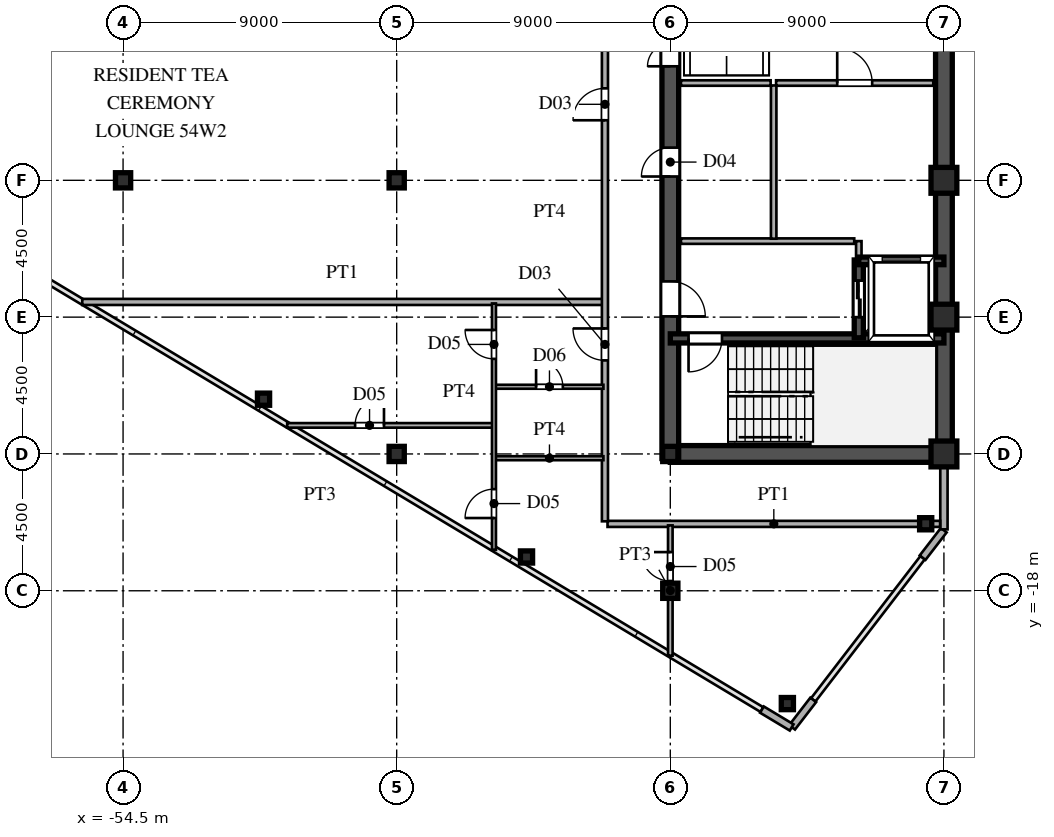
"""IFC4 building model, lengths in metres.
Left out: names, types, materials, properties, quantities, classifications, styles, units other than length and angle.
Written with IfcOpenShell. Run it as: python <this file> out.ifc"""

import sys

from ifc_helpers import new_model, si_unit, direction, frame, frame_2d, origin, origin_2d, place, context, subcontext, project, spatial, rectangle, hollow_rectangle, i_section, extrude, source, transform, mapped, element, fill, save


model = new_model("IFC4")
c1 = context("Model", 3, precision=1e-05, world=origin(), true_north=direction((0.0, 1.0)))
c2 = subcontext(c1, "Body", "Model", "MODEL_VIEW")
j1 = project(units=[si_unit("LENGTHUNIT", "METRE"), si_unit("PLANEANGLEUNIT", "RADIAN")], contexts=[c1])
p1 = place(None, origin())
s1 = spatial("IfcSite", under=j1, at=p1, CompositionType="ELEMENT")
p2 = place(p1, origin())
s2 = spatial("IfcBuilding", under=s1, at=p2, CompositionType="ELEMENT")
p3 = place(p2, frame((0.0, 0.0, 203.1)))
s3 = spatial("IfcBuildingStorey", under=s2, at=p3, CompositionType="ELEMENT", Elevation=203.1)
m1 = source(origin(), c2, "Body", "SweptSolid", [
    extrude(hollow_rectangle(XDim=0.85, YDim=0.85, WallThickness=0.036, at=origin_2d()), origin(), (0.0, 0.0, 1.0), 3.6),
])
for number, where, z_axis, x_axis in (
    (1, (-27.5, -13.5, 0.0), (0.0, 0.0, 1.0), (1.0, 0.0, 0.0)),
    (2, (-27.5, -9.0, 0.0), (0.0, 0.0, 1.0), (1.0, 0.0, 0.0)),
    (3, (-27.5, -4.5, 0.0), (0.0, 0.0, 1.0), (1.0, 0.0, 0.0)),
):
    element("IfcColumn", number, at=place(p3, frame(where, z_axis=z_axis, x_axis=x_axis)), inside=s3, PredefinedType="COLUMN", context=c2, shape_type="MappedRepresentation", body=[
        mapped(m1, transform((0.0, 0.0, 0.0), scale=1.0)),
    ])
m2 = source(origin(), c2, "Body", "SweptSolid", [
    extrude(i_section(OverallWidth=0.5, OverallDepth=0.5, WebThickness=0.02, FlangeThickness=0.032, at=origin_2d()), origin(), (0.0, 0.0, 1.0), 3.6),
])
for number, where, z_axis, x_axis in (
    (4, (-36.5, -18.0, 0.0), (0.0, 0.0, 1.0), (1.0, 0.0, 0.0)),
    (5, (-36.5, -13.5, 0.0), (0.0, 0.0, 1.0), (1.0, 0.0, 0.0)),
    (6, (-45.5, -13.5, 0.0), (0.0, 0.0, 1.0), (1.0, 0.0, 0.0)),
    (7, (-45.5, -4.5, 0.0), (0.0, 0.0, 1.0), (1.0, 0.0, 0.0)),
    (8, (-54.5, -4.5, 0.0), (0.0, 0.0, 1.0), (1.0, 0.0, 0.0)),
):
    element("IfcColumn", number, at=place(p3, frame(where, z_axis=z_axis, x_axis=x_axis)), inside=s3, PredefinedType="COLUMN", context=c2, shape_type="MappedRepresentation", body=[
        mapped(m2, transform((0.0, 0.0, 0.0), scale=1.0)),
    ])
m3 = source(origin(), c2, "Body", "SweptSolid", [
    extrude(hollow_rectangle(XDim=0.4, YDim=0.4, WallThickness=0.016, at=origin_2d()), origin(), (0.0, 0.0, 1.0), 3.6),
])
for number, where, z_axis, x_axis in (
    (9, (-28.1, -15.796, 0.0), (0.0, 0.0, 1.0), (1.0, 0.0, 0.0)),
    (10, (-32.65, -21.71, 0.0), (0.0, 0.0, 1.0), (1.0, 0.0, 0.0)),
    (11, (-41.23, -16.889, 0.0), (0.0, 0.0, 1.0), (1.0, 0.0, 0.0)),
    (12, (-49.88, -11.699, 0.0), (0.0, 0.0, 1.0), (1.0, 0.0, 0.0)),
):
    element("IfcColumn", number, at=place(p3, frame(where, z_axis=z_axis, x_axis=x_axis)), inside=s3, PredefinedType="COLUMN", context=c2, shape_type="MappedRepresentation", body=[
        mapped(m3, transform((0.0, 0.0, 0.0), scale=1.0)),
    ])
p4 = place(p3, frame((-27.5, -15.98, 0.0), z_axis=(0.0, 0.0, 1.0), x_axis=(0.0, 1.0, 0.0)))
e13 = element("IfcWall", 13, at=p4, inside=s3, PredefinedType="SOLIDWALL", context=c2, shape_type="SweptSolid", body=[
    extrude(rectangle(XDim=1.6, YDim=0.24, at=frame_2d((0.8, 0.0))), origin(), (0.0, 0.0, 1.0), 3.38),
])
p5 = place(p3, frame((-27.5, -14.38, 0.0), z_axis=(0.0, 0.0, 1.0), x_axis=(0.0, 1.0, 0.0)))
e14 = element("IfcWall", 14, at=p5, inside=s3, PredefinedType="SOLIDWALL", context=c2, shape_type="SweptSolid", body=[
    extrude(rectangle(XDim=0.6, YDim=0.24, at=frame_2d((0.3, 0.0))), origin(), (0.0, 0.0, 1.0), 2.88),
])
for number, where, z_axis, x_axis in (
    (15, (-33.486, -21.908, 0.0), (0.0, 0.0, 1.0), (0.857, -0.515, 0.0)),
    (16, (-32.494, -22.492, 0.0), (0.0, 0.0, 1.0), (0.61, 0.793, 0.0)),
    (17, (-28.201, -16.912, 0.0), (0.0, 0.0, 1.0), (0.61, 0.793, 0.0)),
):
    element("IfcWall", number, at=place(p3, frame(where, z_axis=z_axis, x_axis=x_axis)), inside=s3, PredefinedType="SOLIDWALL", context=c2, shape_type="SweptSolid", body=[
        extrude(rectangle(XDim=1.14, YDim=0.24, at=frame_2d((0.57, 0.0))), origin(), (0.0, 0.0, 1.0), 3.38),
    ])
p6 = place(p3, frame((-27.5, -13.5, 0.0), z_axis=(0.0, 0.0, 1.0), x_axis=(0.0, 1.0, 0.0)))
e18 = element("IfcWall", 18, at=p6, inside=s3, PredefinedType="SHEAR", context=c2, shape_type="SweptSolid", body=[
    extrude(rectangle(XDim=12.2, YDim=0.55, at=frame_2d((6.1, 0.0))), origin(), (0.0, 0.0, 1.0), 3.38),
])
p7 = place(p3, frame((-27.5, -1.3, 0.0), z_axis=(0.0, 0.0, 1.0), x_axis=(0.0, 1.0, 0.0)))
e19 = element("IfcWall", 19, at=p7, inside=s3, PredefinedType="SHEAR", context=c2, shape_type="SweptSolid", body=[
    extrude(rectangle(XDim=2.6, YDim=0.55, at=frame_2d((1.3, 0.0))), origin(), (0.0, 0.0, 1.0), 3.38),
])
p8 = place(p3, frame((-36.5, -13.5, 0.0), z_axis=(0.0, 0.0, 1.0), x_axis=(1.0, 0.0, 0.0)))
e20 = element("IfcWall", 20, at=p8, inside=s3, PredefinedType="SHEAR", context=c2, shape_type="SweptSolid", body=[
    extrude(rectangle(XDim=9.0, YDim=0.55, at=frame_2d((4.5, 0.0))), origin(), (0.0, 0.0, 1.0), 3.38),
])
p9 = place(p3, frame((-36.5, -13.65, 0.0), z_axis=(0.0, 0.0, 1.0), x_axis=(0.0, 1.0, 0.0)))
e21 = element("IfcWall", 21, at=p9, inside=s3, PredefinedType="SHEAR", context=c2, shape_type="SweptSolid", body=[
    extrude(rectangle(XDim=7.15, YDim=0.55, at=frame_2d((3.575, 0.0))), origin(), (0.0, 0.0, 1.0), 3.38),
])
p10 = place(p9, frame((4.675, 0.0, 0.0)))
e22 = element("IfcOpeningElement", 22, at=p10, cuts=e21, PredefinedType="OPENING", context=c2, shape_type="SweptSolid", body=[
    extrude(rectangle(XDim=1.15, YDim=2.2, at=frame_2d((0.575, 1.1))), frame((0.0, 0.285, 0.0), z_axis=(0.0, -1.0, 0.0), x_axis=(1.0, 0.0, 0.0)), (0.0, 0.0, 1.0), 0.57),
])
p11 = place(p3, frame((-36.5, -1.3, 0.0), z_axis=(0.0, 0.0, 1.0), x_axis=(0.0, 1.0, 0.0)))
e23 = element("IfcWall", 23, at=p11, inside=s3, PredefinedType="SHEAR", context=c2, shape_type="SweptSolid", body=[
    extrude(rectangle(XDim=2.6, YDim=0.55, at=frame_2d((1.3, 0.0))), origin(), (0.0, 0.0, 1.0), 3.38),
])
p12 = place(p11, frame((0.55, 0.0, 0.0)))
e24 = element("IfcOpeningElement", 24, at=p12, cuts=e23, PredefinedType="OPENING", context=c2, shape_type="SweptSolid", body=[
    extrude(rectangle(XDim=1.5, YDim=2.3, at=frame_2d((0.75, 1.15))), frame((0.0, 0.285, 0.0), z_axis=(0.0, -1.0, 0.0), x_axis=(1.0, 0.0, 0.0)), (0.0, 0.0, 1.0), 0.57),
])
p13 = place(p3, frame((-36.5, -6.5, 0.0), z_axis=(0.0, 0.0, 1.0), x_axis=(0.0, 1.0, 0.0)))
e25 = element("IfcWall", 25, at=p13, inside=s3, PredefinedType="SHEAR", context=c2, shape_type="SweptSolid", body=[
    extrude(rectangle(XDim=5.2, YDim=0.55, at=frame_2d((2.6, 0.0))), origin(), (0.0, 0.0, 1.0), 3.38),
])
p14 = place(p13, frame((2.125, 0.0, 0.0)))
e26 = element("IfcOpeningElement", 26, at=p14, cuts=e25, PredefinedType="OPENING", context=c2, shape_type="SweptSolid", body=[
    extrude(rectangle(XDim=0.95, YDim=2.15, at=frame_2d((0.475, 1.075))), frame((0.0, 0.285, 0.0), z_axis=(0.0, -1.0, 0.0), x_axis=(1.0, 0.0, 0.0)), (0.0, 0.0, 1.0), 0.57),
])
p15 = place(p3, frame((-36.5, -9.7, 0.0), z_axis=(0.0, 0.0, 1.0), x_axis=(1.0, 0.0, 0.0)))
e27 = element("IfcWall", 27, at=p15, inside=s3, PredefinedType="SHEAR", context=c2, shape_type="SweptSolid", body=[
    extrude(rectangle(XDim=9.0, YDim=0.3, at=frame_2d((4.5, 0.0))), origin(), (0.0, 0.0, 1.0), 3.38),
])
p16 = place(p15, frame((0.6, 0.0, 0.0)))
e28 = element("IfcOpeningElement", 28, at=p16, cuts=e27, PredefinedType="OPENING", context=c2, shape_type="SweptSolid", body=[
    extrude(rectangle(XDim=1.1, YDim=2.2, at=frame_2d((0.55, 1.1))), frame((0.0, 0.16, 0.0), z_axis=(0.0, -1.0, 0.0), x_axis=(1.0, 0.0, 0.0)), (0.0, 0.0, 1.0), 0.32),
])
p17 = place(p3, frame((-30.3, -7.15, 0.0), z_axis=(0.0, 0.0, 1.0), x_axis=(1.0, 0.0, 0.0)))
e29 = element("IfcWall", 29, at=p17, inside=s3, PredefinedType="SHEAR", context=c2, shape_type="SweptSolid", body=[
    extrude(rectangle(XDim=2.8, YDim=0.25, at=frame_2d((1.4, 0.0))), origin(), (0.0, 0.0, 1.0), 3.38),
])
p18 = place(p3, frame((-30.3, -9.68, 0.0), z_axis=(0.0, 0.0, 1.0), x_axis=(0.0, 1.0, 0.0)))
e30 = element("IfcWall", 30, at=p18, inside=s3, PredefinedType="SHEAR", context=c2, shape_type="SweptSolid", body=[
    extrude(rectangle(XDim=2.56, YDim=0.3, at=frame_2d((1.28, 0.0))), origin(), (0.0, 0.0, 1.0), 3.38),
])
p19 = place(p18, frame((0.68, 0.0, 0.0)))
e31 = element("IfcOpeningElement", 31, at=p19, cuts=e30, PredefinedType="OPENING", context=c2, shape_type="SweptSolid", body=[
    extrude(rectangle(XDim=1.2, YDim=2.25, at=frame_2d((0.6, 1.125))), frame((0.0, 0.16, 0.0), z_axis=(0.0, -1.0, 0.0), x_axis=(1.0, 0.0, 0.0)), (0.0, 0.0, 1.0), 0.32),
])
p20 = place(p3, frame((-36.15, -6.5, 0.0), z_axis=(0.0, 0.0, 1.0), x_axis=(1.0, 0.0, 0.0)))
e32 = element("IfcWall", 32, at=p20, inside=s3, PredefinedType="PARTITIONING", context=c2, shape_type="SweptSolid", body=[
    extrude(rectangle(XDim=5.7, YDim=0.18, at=frame_2d((2.85, 0.0))), origin(), (0.0, 0.0, 1.0), 3.38),
])
p21 = place(p3, frame((-30.3, -7.12, 0.0), z_axis=(0.0, 0.0, 1.0), x_axis=(0.0, 1.0, 0.0)))
e33 = element("IfcWall", 33, at=p21, inside=s3, PredefinedType="PARTITIONING", context=c2, shape_type="SweptSolid", body=[
    extrude(rectangle(XDim=0.62, YDim=0.18, at=frame_2d((0.31, 0.0))), origin(), (0.0, 0.0, 1.0), 3.38),
])
p22 = place(p3, frame((-33.1, -6.42, 0.0), z_axis=(0.0, 0.0, 1.0), x_axis=(0.0, 1.0, 0.0)))
e34 = element("IfcWall", 34, at=p22, inside=s3, PredefinedType="PARTITIONING", context=c2, shape_type="SweptSolid", body=[
    extrude(rectangle(XDim=5.04, YDim=0.18, at=frame_2d((2.52, 0.0))), origin(), (0.0, 0.0, 1.0), 3.38),
])
p23 = place(p3, frame((-33.02, -1.3, 0.0), z_axis=(0.0, 0.0, 1.0), x_axis=(1.0, 0.0, 0.0)))
e35 = element("IfcWall", 35, at=p23, inside=s3, PredefinedType="PARTITIONING", context=c2, shape_type="SweptSolid", body=[
    extrude(rectangle(XDim=5.17, YDim=0.18, at=frame_2d((2.585, 0.0))), origin(), (0.0, 0.0, 1.0), 3.38),
])
p24 = place(p23, frame((2.01, 0.0, 0.0)))
e36 = element("IfcOpeningElement", 36, at=p24, cuts=e35, PredefinedType="OPENING", context=c2, shape_type="SweptSolid", body=[
    extrude(rectangle(XDim=1.15, YDim=2.2, at=frame_2d((0.575, 1.1))), frame((0.0, 0.1, 0.0), z_axis=(0.0, -1.0, 0.0), x_axis=(1.0, 0.0, 0.0)), (0.0, 0.0, 1.0), 0.2),
])
p25 = place(p3, frame((-36.15, -1.3, 0.0), z_axis=(0.0, 0.0, 1.0), x_axis=(1.0, 0.0, 0.0)))
e37 = element("IfcWall", 37, at=p25, inside=s3, PredefinedType="PARTITIONING", context=c2, shape_type="SweptSolid", body=[
    extrude(rectangle(XDim=2.95, YDim=0.18, at=frame_2d((1.475, 0.0))), origin(), (0.0, 0.0, 1.0), 3.38),
])
p26 = place(p3, frame((-38.565, -15.8, 0.0), z_axis=(0.0, 0.0, 1.0), x_axis=(1.0, 0.0, 0.0)))
e38 = element("IfcWall", 38, at=p26, inside=s3, PredefinedType="PARTITIONING", context=c2, shape_type="SweptSolid", body=[
    extrude(rectangle(XDim=10.94, YDim=0.2, at=frame_2d((5.47, 0.0))), origin(), (0.0, 0.0, 1.0), 3.38),
])
p27 = place(p3, frame((-42.25, -13.64, 0.0), z_axis=(0.0, 0.0, 1.0), x_axis=(1.0, 0.0, 0.0)))
e39 = element("IfcWall", 39, at=p27, inside=s3, PredefinedType="PARTITIONING", context=c2, shape_type="SweptSolid", body=[
    extrude(rectangle(XDim=3.55, YDim=0.13, at=frame_2d((1.775, 0.0))), origin(), (0.0, 0.0, 1.0), 3.38),
])
p28 = place(p3, frame((-49.102, -12.56, 0.0), z_axis=(0.0, 0.0, 1.0), x_axis=(1.0, 0.0, 0.0)))
e40 = element("IfcWall", 40, at=p28, inside=s3, PredefinedType="PARTITIONING", context=c2, shape_type="SweptSolid", body=[
    extrude(rectangle(XDim=6.752, YDim=0.15, at=frame_2d((3.376, 0.0))), origin(), (0.0, 0.0, 1.0), 3.38),
])
p29 = place(p28, frame((2.234, 0.0, 0.0)))
e41 = element("IfcOpeningElement", 41, at=p29, cuts=e40, PredefinedType="OPENING", context=c2, shape_type="SweptSolid", body=[
    extrude(rectangle(XDim=0.95, YDim=2.15, at=frame_2d((0.475, 1.075))), frame((0.0, 0.085, 0.0), z_axis=(0.0, -1.0, 0.0), x_axis=(1.0, 0.0, 0.0)), (0.0, 0.0, 1.0), 0.17),
])
p30 = place(p3, frame((-42.25, -11.29, 0.0), z_axis=(0.0, 0.0, 1.0), x_axis=(1.0, 0.0, 0.0)))
e42 = element("IfcWall", 42, at=p30, inside=s3, PredefinedType="PARTITIONING", context=c2, shape_type="SweptSolid", body=[
    extrude(rectangle(XDim=3.55, YDim=0.13, at=frame_2d((1.775, 0.0))), origin(), (0.0, 0.0, 1.0), 3.38),
])
p31 = place(p30, frame((1.335, 0.0, 0.0)))
e43 = element("IfcOpeningElement", 43, at=p31, cuts=e42, PredefinedType="OPENING", context=c2, shape_type="SweptSolid", body=[
    extrude(rectangle(XDim=0.88, YDim=2.1, at=frame_2d((0.44, 1.05))), frame((0.0, 0.075, 0.0), z_axis=(0.0, -1.0, 0.0), x_axis=(1.0, 0.0, 0.0)), (0.0, 0.0, 1.0), 0.15),
])
p32 = place(p3, frame((-55.843, -8.5, 0.0), z_axis=(0.0, 0.0, 1.0), x_axis=(1.0, 0.0, 0.0)))
e44 = element("IfcWall", 44, at=p32, inside=s3, PredefinedType="PARTITIONING", context=c2, shape_type="SweptSolid", body=[
    extrude(rectangle(XDim=17.113, YDim=0.2, at=frame_2d((8.557, 0.0))), origin(), (0.0, 0.0, 1.0), 3.38),
])
p33 = place(p3, frame((-42.3, -16.655, 0.0), z_axis=(0.0, 0.0, 1.0), x_axis=(0.0, 1.0, 0.0)))
e45 = element("IfcWall", 45, at=p33, inside=s3, PredefinedType="PARTITIONING", context=c2, shape_type="SweptSolid", body=[
    extrude(rectangle(XDim=8.105, YDim=0.13, at=frame_2d((4.052, 0.0))), origin(), (0.0, 0.0, 1.0), 3.38),
])
p34 = place(p33, frame((6.282, 0.0, 0.0)))
e46 = element("IfcOpeningElement", 46, at=p34, cuts=e45, PredefinedType="OPENING", context=c2, shape_type="SweptSolid", body=[
    extrude(rectangle(XDim=0.95, YDim=2.15, at=frame_2d((0.475, 1.075))), frame((0.0, 0.075, 0.0), z_axis=(0.0, -1.0, 0.0), x_axis=(1.0, 0.0, 0.0)), (0.0, 0.0, 1.0), 0.15),
])
p35 = place(p33, frame((1.048, 0.0, 0.0)))
e47 = element("IfcOpeningElement", 47, at=p35, cuts=e45, PredefinedType="OPENING", context=c2, shape_type="SweptSolid", body=[
    extrude(rectangle(XDim=0.95, YDim=2.15, at=frame_2d((0.475, 1.075))), frame((0.0, 0.075, 0.0), z_axis=(0.0, -1.0, 0.0), x_axis=(1.0, 0.0, 0.0)), (0.0, 0.0, 1.0), 0.15),
])
p36 = place(p3, frame((-38.65, -15.715, 0.0), z_axis=(0.0, 0.0, 1.0), x_axis=(0.0, 1.0, 0.0)))
e48 = element("IfcWall", 48, at=p36, inside=s3, PredefinedType="PARTITIONING", context=c2, shape_type="SweptSolid", body=[
    extrude(rectangle(XDim=31.43, YDim=0.2, at=frame_2d((15.715, 0.0))), origin(), (0.0, 0.0, 1.0), 3.38),
])
p37 = place(p36, frame((5.292, 0.0, 0.0)))
e49 = element("IfcOpeningElement", 49, at=p37, cuts=e48, PredefinedType="OPENING", context=c2, shape_type="SweptSolid", body=[
    extrude(rectangle(XDim=1.05, YDim=2.25, at=frame_2d((0.525, 1.125))), frame((0.0, 0.11, 0.0), z_axis=(0.0, -1.0, 0.0), x_axis=(1.0, 0.0, 0.0)), (0.0, 0.0, 1.0), 0.22),
])
p38 = place(p36, frame((13.19, 0.0, 0.0)))
e50 = element("IfcOpeningElement", 50, at=p38, cuts=e48, PredefinedType="OPENING", context=c2, shape_type="SweptSolid", body=[
    extrude(rectangle(XDim=1.05, YDim=2.25, at=frame_2d((0.525, 1.125))), frame((0.0, 0.11, 0.0), z_axis=(0.0, -1.0, 0.0), x_axis=(1.0, 0.0, 0.0)), (0.0, 0.0, 1.0), 0.22),
])
p39 = place(p36, frame((25.34, 0.0, 0.0)))
e51 = element("IfcOpeningElement", 51, at=p39, cuts=e48, PredefinedType="OPENING", context=c2, shape_type="SweptSolid", body=[
    extrude(rectangle(XDim=1.05, YDim=2.25, at=frame_2d((0.525, 1.125))), frame((0.0, 0.11, 0.0), z_axis=(0.0, -1.0, 0.0), x_axis=(1.0, 0.0, 0.0)), (0.0, 0.0, 1.0), 0.22),
])
p40 = place(p3, frame((-36.5, -20.135, 0.0), z_axis=(0.0, 0.0, 1.0), x_axis=(0.0, 1.0, 0.0)))
e52 = element("IfcWall", 52, at=p40, inside=s3, PredefinedType="PARTITIONING", context=c2, shape_type="SweptSolid", body=[
    extrude(rectangle(XDim=4.285, YDim=0.15, at=frame_2d((2.143, 0.0))), origin(), (0.0, 0.0, 1.0), 2.78),
])
p41 = place(p40, frame((2.457, 0.0, 0.0)))
e53 = element("IfcOpeningElement", 53, at=p41, cuts=e52, PredefinedType="OPENING", context=c2, shape_type="SweptSolid", body=[
    extrude(rectangle(XDim=0.95, YDim=2.15, at=frame_2d((0.475, 1.075))), frame((0.0, 0.085, 0.0), z_axis=(0.0, -1.0, 0.0), x_axis=(1.0, 0.0, 0.0)), (0.0, 0.0, 1.0), 0.17),
])
m4 = source(origin(), c2, "Body", "SweptSolid", [
    extrude(rectangle(XDim=1.15, YDim=2.2, at=frame_2d((0.575, 1.1))), frame((0.0, 0.025, 0.0), z_axis=(0.0, -1.0, 0.0), x_axis=(1.0, 0.0, 0.0)), (0.0, 0.0, 1.0), 0.05),
])
p42 = place(p10, frame((1.15, 0.0, 0.0), z_axis=(0.0, 0.0, 1.0), x_axis=(-1.0, 0.0, 0.0)))
e54 = element("IfcDoor", 54, at=p42, inside=s3, OperationType="SINGLE_SWING_LEFT", PredefinedType="DOOR", context=c2, shape_type="MappedRepresentation", body=[
    mapped(m4, transform((0.0, 0.0, 0.0), scale=1.0)),
])
fill(e22, e54)
m5 = source(origin(), c2, "Body", "SweptSolid", [
    extrude(rectangle(XDim=1.5, YDim=2.3, at=frame_2d((0.75, 1.15))), frame((0.0, 0.025, 0.0), z_axis=(0.0, -1.0, 0.0), x_axis=(1.0, 0.0, 0.0)), (0.0, 0.0, 1.0), 0.05),
])
p43 = place(p12, origin())
e55 = element("IfcDoor", 55, at=p43, inside=s3, OperationType="DOUBLE_SWING_LEFT", PredefinedType="DOOR", context=c2, shape_type="MappedRepresentation", body=[
    mapped(m5, transform((0.0, 0.0, 0.0), scale=1.0)),
])
fill(e24, e55)
m6 = source(origin(), c2, "Body", "SweptSolid", [
    extrude(rectangle(XDim=0.95, YDim=2.15, at=frame_2d((0.475, 1.075))), frame((0.0, 0.025, 0.0), z_axis=(0.0, -1.0, 0.0), x_axis=(1.0, 0.0, 0.0)), (0.0, 0.0, 1.0), 0.05),
])
p44 = place(p14, origin())
e56 = element("IfcDoor", 56, at=p44, inside=s3, OperationType="SINGLE_SWING_LEFT", PredefinedType="DOOR", context=c2, shape_type="MappedRepresentation", body=[
    mapped(m6, transform((0.0, 0.0, 0.0), scale=1.0)),
])
fill(e26, e56)
m7 = source(origin(), c2, "Body", "SweptSolid", [
    extrude(rectangle(XDim=1.1, YDim=2.2, at=frame_2d((0.55, 1.1))), frame((0.0, 0.025, 0.0), z_axis=(0.0, -1.0, 0.0), x_axis=(1.0, 0.0, 0.0)), (0.0, 0.0, 1.0), 0.05),
])
p45 = place(p16, frame((1.1, 0.0, 0.0), z_axis=(0.0, 0.0, 1.0), x_axis=(-1.0, 0.0, 0.0)))
e57 = element("IfcDoor", 57, at=p45, inside=s3, OperationType="SINGLE_SWING_LEFT", PredefinedType="DOOR", context=c2, shape_type="MappedRepresentation", body=[
    mapped(m7, transform((0.0, 0.0, 0.0), scale=1.0)),
])
fill(e28, e57)
m8 = source(origin(), c2, "Body", "SweptSolid", [
    extrude(rectangle(XDim=1.2, YDim=2.25, at=frame_2d((0.6, 1.125))), frame((0.0, 0.025, 0.0), z_axis=(0.0, -1.0, 0.0), x_axis=(1.0, 0.0, 0.0)), (0.0, 0.0, 1.0), 0.05),
])
p46 = place(p19, origin())
e58 = element("IfcDoor", 58, at=p46, inside=s3, OperationType="DOUBLE_DOOR_SLIDING", PredefinedType="DOOR", context=c2, shape_type="MappedRepresentation", body=[
    mapped(m8, transform((0.0, 0.0, 0.0), scale=1.0)),
])
fill(e31, e58)
p47 = place(p24, origin())
e59 = element("IfcDoor", 59, at=p47, inside=s3, OperationType="SINGLE_SWING_LEFT", PredefinedType="DOOR", context=c2, shape_type="MappedRepresentation", body=[
    mapped(m4, transform((0.0, 0.0, 0.0), scale=1.0)),
])
fill(e36, e59)
m9 = source(origin(), c2, "Body", "SweptSolid", [
    extrude(rectangle(XDim=0.95, YDim=2.15, at=frame_2d((0.475, 1.075))), frame((0.0, 0.025, 0.0), z_axis=(0.0, -1.0, 0.0), x_axis=(1.0, 0.0, 0.0)), (0.0, 0.0, 1.0), 0.05),
])
p48 = place(p29, origin())
e60 = element("IfcDoor", 60, at=p48, inside=s3, OperationType="SINGLE_SWING_RIGHT", PredefinedType="DOOR", context=c2, shape_type="MappedRepresentation", body=[
    mapped(m9, transform((0.0, 0.0, 0.0), scale=1.0)),
])
fill(e41, e60)
m10 = source(origin(), c2, "Body", "SweptSolid", [
    extrude(rectangle(XDim=0.88, YDim=2.1, at=frame_2d((0.44, 1.05))), frame((0.0, 0.025, 0.0), z_axis=(0.0, -1.0, 0.0), x_axis=(1.0, 0.0, 0.0)), (0.0, 0.0, 1.0), 0.05),
])
p49 = place(p31, origin())
e61 = element("IfcDoor", 61, at=p49, inside=s3, OperationType="SINGLE_SWING_LEFT", PredefinedType="DOOR", context=c2, shape_type="MappedRepresentation", body=[
    mapped(m10, transform((0.0, 0.0, 0.0), scale=1.0)),
])
fill(e43, e61)
p50 = place(p34, origin())
e62 = element("IfcDoor", 62, at=p50, inside=s3, OperationType="SINGLE_SWING_RIGHT", PredefinedType="DOOR", context=c2, shape_type="MappedRepresentation", body=[
    mapped(m9, transform((0.0, 0.0, 0.0), scale=1.0)),
])
fill(e46, e62)
p51 = place(p35, origin())
e63 = element("IfcDoor", 63, at=p51, inside=s3, OperationType="SINGLE_SWING_LEFT", PredefinedType="DOOR", context=c2, shape_type="MappedRepresentation", body=[
    mapped(m9, transform((0.0, 0.0, 0.0), scale=1.0)),
])
fill(e47, e63)
m11 = source(origin(), c2, "Body", "SweptSolid", [
    extrude(rectangle(XDim=1.05, YDim=2.25, at=frame_2d((0.525, 1.125))), frame((0.0, 0.025, 0.0), z_axis=(0.0, -1.0, 0.0), x_axis=(1.0, 0.0, 0.0)), (0.0, 0.0, 1.0), 0.05),
])
p52 = place(p37, origin())
e64 = element("IfcDoor", 64, at=p52, inside=s3, OperationType="SINGLE_SWING_RIGHT", PredefinedType="DOOR", context=c2, shape_type="MappedRepresentation", body=[
    mapped(m11, transform((0.0, 0.0, 0.0), scale=1.0)),
])
fill(e49, e64)
p53 = place(p38, origin())
e65 = element("IfcDoor", 65, at=p53, inside=s3, OperationType="SINGLE_SWING_LEFT", PredefinedType="DOOR", context=c2, shape_type="MappedRepresentation", body=[
    mapped(m11, transform((0.0, 0.0, 0.0), scale=1.0)),
])
fill(e50, e65)
p54 = place(p41, origin())
e66 = element("IfcDoor", 66, at=p54, inside=s3, OperationType="SINGLE_SWING_RIGHT", PredefinedType="DOOR", context=c2, shape_type="MappedRepresentation", body=[
    mapped(m9, transform((0.0, 0.0, 0.0), scale=1.0)),
])
fill(e53, e66)
save(model, sys.argv[1])
